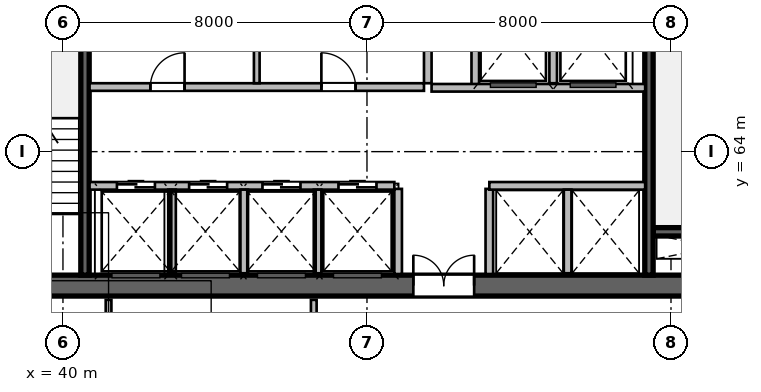
"""IFC4 building model, lengths in metres.
Left out: names, types, materials, properties, quantities, classifications, styles, units other than length and angle.
Written with IfcOpenShell. Run it as: python <this file> out.ifc"""

import sys

from ifc_helpers import new_model, si_unit, direction, frame, frame_2d, origin, place, context, subcontext, project, spatial, rectangle, extrude, source, transform, mapped, element, fill, save


model = new_model("IFC4")
c1 = context("Model", 3, precision=1e-05, world=origin(), true_north=direction((0.0, 1.0)))
c2 = subcontext(c1, "Body", "Model", "MODEL_VIEW")
j1 = project(units=[si_unit("LENGTHUNIT", "METRE"), si_unit("PLANEANGLEUNIT", "RADIAN")], contexts=[c1])
p1 = place(None, origin())
s1 = spatial("IfcSite", under=j1, at=p1, CompositionType="ELEMENT")
p2 = place(p1, origin())
s2 = spatial("IfcBuilding", under=s1, at=p2, CompositionType="ELEMENT")
p3 = place(p2, frame((0.0, 0.0, 60.6)))
s3 = spatial("IfcBuildingStorey", under=s2, at=p3, CompositionType="ELEMENT", Elevation=60.6)
m1 = source(origin(), c2, "Body", "SweptSolid", [
    extrude(rectangle(XDim=21.6, YDim=0.55, at=frame_2d((10.8, 0.0))), origin(), (0.0, 0.0, 1.0), 3.6),
])
p4 = place(p3, frame((37.2, 60.475, 0.0), z_axis=(0.0, 0.0, 1.0), x_axis=(1.0, 0.0, 0.0)))
e1 = element("IfcWall", 1, at=p4, inside=s3, PredefinedType="SHEAR", context=c2, shape_type="MappedRepresentation", body=[
    mapped(m1, transform((0.0, 0.0, 0.0), scale=1.0)),
])
p5 = place(p4, frame((1.1, 0.0, 0.0)))
e2 = element("IfcOpeningElement", 2, at=p5, cuts=e1, PredefinedType="OPENING", context=c2, shape_type="SweptSolid", body=[
    extrude(rectangle(XDim=1.15, YDim=2.15, at=frame_2d((0.575, 1.075))), frame((0.0, 0.285, 0.0), z_axis=(0.0, -1.0, 0.0), x_axis=(1.0, 0.0, 0.0)), (0.0, 0.0, 1.0), 0.57),
])
p6 = place(p4, frame((19.5, 0.0, 0.0)))
e3 = element("IfcOpeningElement", 3, at=p6, cuts=e1, PredefinedType="OPENING", context=c2, shape_type="SweptSolid", body=[
    extrude(rectangle(XDim=0.9, YDim=2.1, at=frame_2d((0.45, 1.05))), frame((0.0, 0.285, 0.0), z_axis=(0.0, -1.0, 0.0), x_axis=(1.0, 0.0, 0.0)), (0.0, 0.0, 1.0), 0.57),
])
p7 = place(p4, frame((12.02, 0.0, 0.0)))
e4 = element("IfcOpeningElement", 4, at=p7, cuts=e1, PredefinedType="OPENING", context=c2, shape_type="SweptSolid", body=[
    extrude(rectangle(XDim=1.6, YDim=2.15, at=frame_2d((0.8, 1.075))), frame((0.0, 0.285, 0.0), z_axis=(0.0, -1.0, 0.0), x_axis=(1.0, 0.0, 0.0)), (0.0, 0.0, 1.0), 0.57),
])
m2 = source(origin(), c2, "Body", "SweptSolid", [
    extrude(rectangle(XDim=3.27, YDim=0.22, at=frame_2d((1.635, 0.0))), origin(), (0.0, 0.0, 1.0), 3.6),
])
p8 = place(p3, frame((55.53, 61.89, 0.0), z_axis=(0.0, 0.0, 1.0), x_axis=(1.0, 0.0, 0.0)))
e5 = element("IfcWall", 5, at=p8, inside=s3, PredefinedType="SHEAR", context=c2, shape_type="MappedRepresentation", body=[
    mapped(m2, transform((0.0, 0.0, 0.0), scale=1.0)),
])
m3 = source(origin(), c2, "Body", "SweptSolid", [
    extrude(rectangle(XDim=10.9, YDim=0.22, at=frame_2d((5.45, 0.0))), origin(), (0.0, 0.0, 1.0), 3.6),
])
p9 = place(p3, frame((40.58, 60.75, 0.0), z_axis=(0.0, 0.0, 1.0), x_axis=(0.0, 1.0, 0.0)))
e6 = element("IfcWall", 6, at=p9, inside=s3, PredefinedType="SHEAR", context=c2, shape_type="MappedRepresentation", body=[
    mapped(m3, transform((0.0, 0.0, 0.0), scale=1.0)),
])
p10 = place(p3, frame((55.42, 60.75, 0.0), z_axis=(0.0, 0.0, 1.0), x_axis=(0.0, 1.0, 0.0)))
e7 = element("IfcWall", 7, at=p10, inside=s3, PredefinedType="SHEAR", context=c2, shape_type="MappedRepresentation", body=[
    mapped(m3, transform((0.0, 0.0, 0.0), scale=1.0)),
])
p11 = place(p10, frame((9.495, 0.0, 0.0)))
e8 = element("IfcOpeningElement", 8, at=p11, cuts=e7, PredefinedType="OPENING", context=c2, shape_type="SweptSolid", body=[
    extrude(rectangle(XDim=1.15, YDim=2.15, at=frame_2d((0.575, 1.075))), frame((0.0, 0.12, 0.0), z_axis=(0.0, -1.0, 0.0), x_axis=(1.0, 0.0, 0.0)), (0.0, 0.0, 1.0), 0.24),
])
m4 = source(origin(), c2, "Body", "SweptSolid", [
    extrude(rectangle(XDim=2.24, YDim=0.2, at=frame_2d((1.12, 0.0))), origin(), (0.0, 0.0, 1.0), 3.36),
])
for number, where, z_axis, x_axis in (
    (9, (48.82, 60.78, 0.0), (0.0, 0.0, 1.0), (0.0, 1.0, 0.0)),
    (10, (51.22, 60.78, 0.0), (0.0, 0.0, 1.0), (0.0, 1.0, 0.0)),
):
    element("IfcWall", number, at=place(p3, frame(where, z_axis=z_axis, x_axis=x_axis)), inside=s3, PredefinedType="SOLIDWALL", context=c2, shape_type="MappedRepresentation", body=[
        mapped(m4, transform((0.0, 0.0, 0.0), scale=1.0)),
    ])
m5 = source(origin(), c2, "Body", "SweptSolid", [
    extrude(rectangle(XDim=5.8, YDim=0.2, at=frame_2d((2.9, 0.0))), origin(), (0.0, 0.0, 1.0), 3.36),
])
p12 = place(p3, frame((49.6, 65.8, 0.0), z_axis=(0.0, 0.0, 1.0), x_axis=(0.0, 1.0, 0.0)))
e11 = element("IfcWall", 11, at=p12, inside=s3, PredefinedType="SOLIDWALL", context=c2, shape_type="MappedRepresentation", body=[
    mapped(m5, transform((0.0, 0.0, 0.0), scale=1.0)),
])
m6 = source(origin(), c2, "Body", "SweptSolid", [
    extrude(rectangle(XDim=2.58, YDim=0.2, at=frame_2d((1.29, 0.0))), origin(), (0.0, 0.0, 1.0), 3.36),
])
p13 = place(p3, frame((50.85, 65.68, 0.0), z_axis=(0.0, 0.0, 1.0), x_axis=(0.0, 1.0, 0.0)))
e12 = element("IfcWall", 12, at=p13, inside=s3, PredefinedType="SOLIDWALL", context=c2, shape_type="MappedRepresentation", body=[
    mapped(m6, transform((0.0, 0.0, 0.0), scale=1.0)),
])
m7 = source(origin(), c2, "Body", "SweptSolid", [
    extrude(rectangle(XDim=2.4, YDim=0.2, at=frame_2d((1.2, 0.0))), origin(), (0.0, 0.0, 1.0), 3.36),
])
p14 = place(p3, frame((52.9, 65.8, 0.0), z_axis=(0.0, 0.0, 1.0), x_axis=(0.0, 1.0, 0.0)))
e13 = element("IfcWall", 13, at=p14, inside=s3, PredefinedType="SOLIDWALL", context=c2, shape_type="MappedRepresentation", body=[
    mapped(m7, transform((0.0, 0.0, 0.0), scale=1.0)),
])
m8 = source(origin(), c2, "Body", "SweptSolid", [
    extrude(rectangle(XDim=5.62, YDim=0.2, at=frame_2d((2.81, 0.0))), origin(), (0.0, 0.0, 1.0), 3.36),
])
p15 = place(p3, frame((49.7, 65.68, 0.0), z_axis=(0.0, 0.0, 1.0), x_axis=(1.0, 0.0, 0.0)))
e14 = element("IfcWall", 14, at=p15, inside=s3, PredefinedType="SOLIDWALL", context=c2, shape_type="MappedRepresentation", body=[
    mapped(m8, transform((0.0, 0.0, 0.0), scale=1.0)),
])
m9 = source(origin(), c2, "Body", "SweptSolid", [
    extrude(rectangle(XDim=8.02, YDim=0.2, at=frame_2d((4.01, 0.0))), origin(), (0.0, 0.0, 1.0), 3.36),
])
p16 = place(p3, frame((40.7, 63.1, 0.0), z_axis=(0.0, 0.0, 1.0), x_axis=(1.0, 0.0, 0.0)))
e15 = element("IfcWall", 15, at=p16, inside=s3, PredefinedType="SOLIDWALL", context=c2, shape_type="MappedRepresentation", body=[
    mapped(m9, transform((0.0, 0.0, 0.0), scale=1.0)),
])
p17 = place(p16, frame((0.72, 0.0, 0.0)))
e16 = element("IfcOpeningElement", 16, at=p17, cuts=e15, PredefinedType="OPENING", context=c2, shape_type="SweptSolid", body=[
    extrude(rectangle(XDim=1.0, YDim=2.15, at=frame_2d((0.5, 1.075))), frame((0.0, 0.11, 0.0), z_axis=(0.0, -1.0, 0.0), x_axis=(1.0, 0.0, 0.0)), (0.0, 0.0, 1.0), 0.22),
])
p18 = place(p16, frame((2.62, 0.0, 0.0)))
e17 = element("IfcOpeningElement", 17, at=p18, cuts=e15, PredefinedType="OPENING", context=c2, shape_type="SweptSolid", body=[
    extrude(rectangle(XDim=1.0, YDim=2.15, at=frame_2d((0.5, 1.075))), frame((0.0, 0.11, 0.0), z_axis=(0.0, -1.0, 0.0), x_axis=(1.0, 0.0, 0.0)), (0.0, 0.0, 1.0), 0.22),
])
p19 = place(p16, frame((4.55, 0.0, 0.0)))
e18 = element("IfcOpeningElement", 18, at=p19, cuts=e15, PredefinedType="OPENING", context=c2, shape_type="SweptSolid", body=[
    extrude(rectangle(XDim=1.0, YDim=2.15, at=frame_2d((0.5, 1.075))), frame((0.0, 0.11, 0.0), z_axis=(0.0, -1.0, 0.0), x_axis=(1.0, 0.0, 0.0)), (0.0, 0.0, 1.0), 0.22),
])
p20 = place(p16, frame((6.55, 0.0, 0.0)))
e19 = element("IfcOpeningElement", 19, at=p20, cuts=e15, PredefinedType="OPENING", context=c2, shape_type="SweptSolid", body=[
    extrude(rectangle(XDim=1.0, YDim=2.15, at=frame_2d((0.5, 1.075))), frame((0.0, 0.11, 0.0), z_axis=(0.0, -1.0, 0.0), x_axis=(1.0, 0.0, 0.0)), (0.0, 0.0, 1.0), 0.22),
])
m10 = source(origin(), c2, "Body", "SweptSolid", [
    extrude(rectangle(XDim=4.1, YDim=0.2, at=frame_2d((2.05, 0.0))), origin(), (0.0, 0.0, 1.0), 3.36),
])
p21 = place(p3, frame((51.22, 63.1, 0.0), z_axis=(0.0, 0.0, 1.0), x_axis=(1.0, 0.0, 0.0)))
e20 = element("IfcWall", 20, at=p21, inside=s3, PredefinedType="SOLIDWALL", context=c2, shape_type="MappedRepresentation", body=[
    mapped(m10, transform((0.0, 0.0, 0.0), scale=1.0)),
])
m11 = source(origin(), c2, "Body", "SweptSolid", [
    extrude(rectangle(XDim=2.2, YDim=0.2, at=frame_2d((1.1, 0.0))), origin(), (0.0, 0.0, 1.0), 3.36),
])
for number, where, z_axis, x_axis in (
    (21, (42.87, 60.8, 0.0), (0.0, 0.0, 1.0), (0.0, 1.0, 0.0)),
    (22, (44.77, 60.8, 0.0), (0.0, 0.0, 1.0), (0.0, 1.0, 0.0)),
    (23, (46.7, 60.8, 0.0), (0.0, 0.0, 1.0), (0.0, 1.0, 0.0)),
    (24, (53.28, 60.8, 0.0), (0.0, 0.0, 1.0), (0.0, 1.0, 0.0)),
):
    element("IfcWall", number, at=place(p3, frame(where, z_axis=z_axis, x_axis=x_axis)), inside=s3, PredefinedType="SOLIDWALL", context=c2, shape_type="MappedRepresentation", body=[
        mapped(m11, transform((0.0, 0.0, 0.0), scale=1.0)),
    ])
m12 = source(origin(), c2, "Body", "SweptSolid", [
    extrude(rectangle(XDim=8.8, YDim=0.2, at=frame_2d((4.4, 0.0))), origin(), (0.0, 0.0, 1.0), 3.36),
])
p22 = place(p3, frame((40.7, 65.7, 0.0), z_axis=(0.0, 0.0, 1.0), x_axis=(1.0, 0.0, 0.0)))
e25 = element("IfcWall", 25, at=p22, inside=s3, PredefinedType="SOLIDWALL", context=c2, shape_type="MappedRepresentation", body=[
    mapped(m12, transform((0.0, 0.0, 0.0), scale=1.0)),
])
p23 = place(p22, frame((1.6, 0.0, 0.0)))
e26 = element("IfcOpeningElement", 26, at=p23, cuts=e25, PredefinedType="OPENING", context=c2, shape_type="SweptSolid", body=[
    extrude(rectangle(XDim=0.9, YDim=2.1, at=frame_2d((0.45, 1.05))), frame((0.0, 0.11, 0.0), z_axis=(0.0, -1.0, 0.0), x_axis=(1.0, 0.0, 0.0)), (0.0, 0.0, 1.0), 0.22),
])
p24 = place(p22, frame((6.1, 0.0, 0.0)))
e27 = element("IfcOpeningElement", 27, at=p24, cuts=e25, PredefinedType="OPENING", context=c2, shape_type="SweptSolid", body=[
    extrude(rectangle(XDim=0.9, YDim=2.1, at=frame_2d((0.45, 1.05))), frame((0.0, 0.11, 0.0), z_axis=(0.0, -1.0, 0.0), x_axis=(1.0, 0.0, 0.0)), (0.0, 0.0, 1.0), 0.22),
])
m13 = source(origin(), c2, "Body", "SweptSolid", [
    extrude(rectangle(XDim=2.4, YDim=0.15, at=frame_2d((1.2, 0.0))), origin(), (0.0, 0.0, 1.0), 3.36),
])
p25 = place(p3, frame((45.1, 65.8, 0.0), z_axis=(0.0, 0.0, 1.0), x_axis=(0.0, 1.0, 0.0)))
e28 = element("IfcWall", 28, at=p25, inside=s3, PredefinedType="PARTITIONING", context=c2, shape_type="MappedRepresentation", body=[
    mapped(m13, transform((0.0, 0.0, 0.0), scale=1.0)),
])
m14 = source(origin(), c2, "Body", "SweptSolid", [
    extrude(rectangle(XDim=2.033, YDim=0.15, at=frame_2d((1.016, 0.0))), origin(), (0.0, 0.0, 1.0), 3.36),
])
p26 = place(p3, frame((41.2, 58.067, 0.0), z_axis=(0.0, 0.0, 1.0), x_axis=(0.0, 1.0, 0.0)))
e29 = element("IfcWall", 29, at=p26, inside=s3, PredefinedType="PARTITIONING", context=c2, shape_type="MappedRepresentation", body=[
    mapped(m14, transform((0.0, 0.0, 0.0), scale=1.0)),
])
p27 = place(p26, frame((0.591, 0.0, 0.0)))
e30 = element("IfcOpeningElement", 30, at=p27, cuts=e29, PredefinedType="OPENING", context=c2, shape_type="SweptSolid", body=[
    extrude(rectangle(XDim=0.85, YDim=2.1, at=frame_2d((0.425, 1.05))), frame((0.0, 0.085, 0.0), z_axis=(0.0, -1.0, 0.0), x_axis=(1.0, 0.0, 0.0)), (0.0, 0.0, 1.0), 0.17),
])
p28 = place(p3, frame((46.6, 58.067, 0.0), z_axis=(0.0, 0.0, 1.0), x_axis=(0.0, 1.0, 0.0)))
e31 = element("IfcWall", 31, at=p28, inside=s3, PredefinedType="PARTITIONING", context=c2, shape_type="MappedRepresentation", body=[
    mapped(m14, transform((0.0, 0.0, 0.0), scale=1.0)),
])
m15 = source(origin(), c2, "Body", "SweptSolid", [
    extrude(rectangle(XDim=1.6, YDim=2.15, at=frame_2d((0.8, 1.075))), frame((0.0, 0.025, 0.0), z_axis=(0.0, -1.0, 0.0), x_axis=(1.0, 0.0, 0.0)), (0.0, 0.0, 1.0), 0.05),
])
p29 = place(p7, origin())
e32 = element("IfcDoor", 32, at=p29, inside=s3, OperationType="DOUBLE_DOOR_SINGLE_SWING", PredefinedType="DOOR", context=c2, shape_type="MappedRepresentation", body=[
    mapped(m15, transform((0.0, 0.0, 0.0), scale=1.0)),
])
fill(e4, e32)
m16 = source(origin(), c2, "Body", "SweptSolid", [
    extrude(rectangle(XDim=1.0, YDim=2.15, at=frame_2d((0.5, 1.075))), frame((0.0, 0.025, 0.0), z_axis=(0.0, -1.0, 0.0), x_axis=(1.0, 0.0, 0.0)), (0.0, 0.0, 1.0), 0.05),
])
p30 = place(p17, origin())
e33 = element("IfcDoor", 33, at=p30, inside=s3, OperationType="DOUBLE_DOOR_SLIDING", PredefinedType="DOOR", context=c2, shape_type="MappedRepresentation", body=[
    mapped(m16, transform((0.0, 0.0, 0.0), scale=1.0)),
])
fill(e16, e33)
p31 = place(p18, origin())
e34 = element("IfcDoor", 34, at=p31, inside=s3, OperationType="DOUBLE_DOOR_SLIDING", PredefinedType="DOOR", context=c2, shape_type="MappedRepresentation", body=[
    mapped(m16, transform((0.0, 0.0, 0.0), scale=1.0)),
])
fill(e17, e34)
p32 = place(p19, origin())
e35 = element("IfcDoor", 35, at=p32, inside=s3, OperationType="DOUBLE_DOOR_SLIDING", PredefinedType="DOOR", context=c2, shape_type="MappedRepresentation", body=[
    mapped(m16, transform((0.0, 0.0, 0.0), scale=1.0)),
])
fill(e18, e35)
p33 = place(p20, origin())
e36 = element("IfcDoor", 36, at=p33, inside=s3, OperationType="DOUBLE_DOOR_SLIDING", PredefinedType="DOOR", context=c2, shape_type="MappedRepresentation", body=[
    mapped(m16, transform((0.0, 0.0, 0.0), scale=1.0)),
])
fill(e19, e36)
m17 = source(origin(), c2, "Body", "SweptSolid", [
    extrude(rectangle(XDim=0.9, YDim=2.1, at=frame_2d((0.45, 1.05))), frame((0.0, 0.025, 0.0), z_axis=(0.0, -1.0, 0.0), x_axis=(1.0, 0.0, 0.0)), (0.0, 0.0, 1.0), 0.05),
])
p34 = place(p23, origin())
e37 = element("IfcDoor", 37, at=p34, inside=s3, OperationType="SINGLE_SWING_RIGHT", PredefinedType="DOOR", context=c2, shape_type="MappedRepresentation", body=[
    mapped(m17, transform((0.0, 0.0, 0.0), scale=1.0)),
])
fill(e26, e37)
p35 = place(p24, origin())
e38 = element("IfcDoor", 38, at=p35, inside=s3, OperationType="SINGLE_SWING_LEFT", PredefinedType="DOOR", context=c2, shape_type="MappedRepresentation", body=[
    mapped(m17, transform((0.0, 0.0, 0.0), scale=1.0)),
])
fill(e27, e38)
save(model, sys.argv[1])
